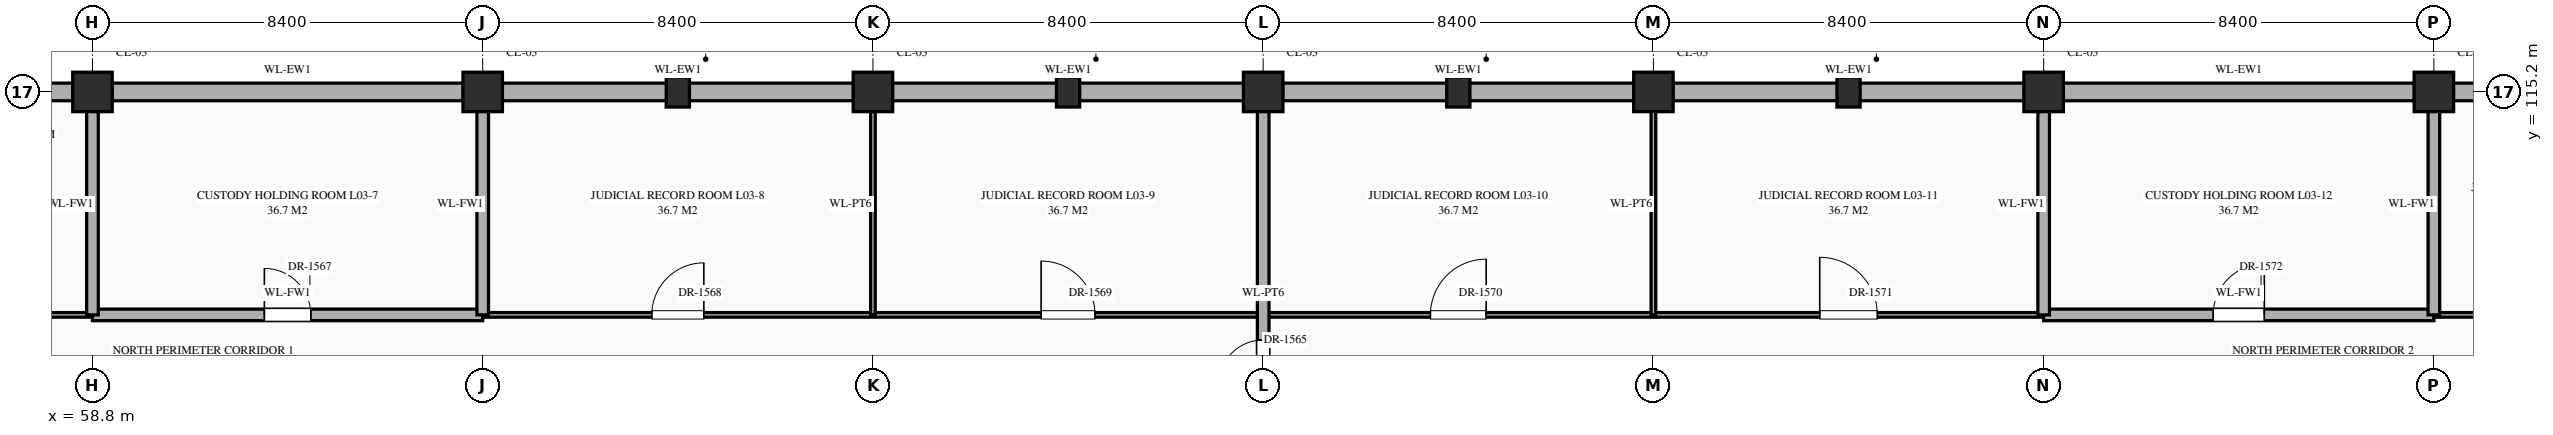
"""IFC4 building model, lengths in metres.
Left out: names, types, materials, properties, quantities, classifications, styles, units other than length and angle.
Written with IfcOpenShell. Run it as: python <this file> out.ifc"""

import sys

from ifc_helpers import new_model, si_unit, direction, frame, frame_2d, origin, origin_2d, place, context, subcontext, project, spatial, rectangle, extrude, element, fill, save


model = new_model("IFC4")
c1 = context("Model", 3, precision=1e-05, world=origin(), true_north=direction((0.0, 1.0)))
c2 = subcontext(c1, "Body", "Model", "MODEL_VIEW")
j1 = project(units=[si_unit("LENGTHUNIT", "METRE"), si_unit("PLANEANGLEUNIT", "RADIAN")], contexts=[c1])
p1 = place(None, origin())
s1 = spatial("IfcSite", under=j1, at=p1, CompositionType="ELEMENT")
p2 = place(p1, origin())
s2 = spatial("IfcBuilding", under=s1, at=p2, CompositionType="ELEMENT")
p3 = place(p2, frame((0.0, 0.0, 10.8)))
s3 = spatial("IfcBuildingStorey", under=s2, at=p3, CompositionType="ELEMENT", Elevation=10.8)
for number, where, z_axis, x_axis in (
    (1, (58.8, 115.2, 0.0), (0.0, 0.0, 1.0), (1.0, 0.0, 0.0)),
    (2, (67.2, 115.2, 0.0), (0.0, 0.0, 1.0), (1.0, 0.0, 0.0)),
    (3, (75.6, 115.2, 0.0), (0.0, 0.0, 1.0), (1.0, 0.0, 0.0)),
    (4, (84.0, 115.2, 0.0), (0.0, 0.0, 1.0), (1.0, 0.0, 0.0)),
    (5, (92.4, 115.2, 0.0), (0.0, 0.0, 1.0), (1.0, 0.0, 0.0)),
    (6, (100.8, 115.2, 0.0), (0.0, 0.0, 1.0), (1.0, 0.0, 0.0)),
    (7, (109.2, 115.2, 0.0), (0.0, 0.0, 1.0), (1.0, 0.0, 0.0)),
):
    element("IfcColumn", number, at=place(p3, frame(where, z_axis=z_axis, x_axis=x_axis)), inside=s3, PredefinedType="COLUMN", context=c2, shape_type="SweptSolid", body=[
        extrude(rectangle(XDim=0.85, YDim=0.85, at=origin_2d()), origin(), (0.0, 0.0, 1.0), 5.4),
    ])
for number, where, z_axis, x_axis in (
    (8, (71.4, 115.2, 0.0), (0.0, 0.0, 1.0), (1.0, 0.0, 0.0)),
    (9, (79.8, 115.2, 0.0), (0.0, 0.0, 1.0), (1.0, 0.0, 0.0)),
    (10, (88.2, 115.2, 0.0), (0.0, 0.0, 1.0), (1.0, 0.0, 0.0)),
    (11, (96.6, 115.2, 0.0), (0.0, 0.0, 1.0), (1.0, 0.0, 0.0)),
):
    element("IfcColumn", number, at=place(p3, frame(where, z_axis=z_axis, x_axis=x_axis)), inside=s3, PredefinedType="PILASTER", context=c2, shape_type="SweptSolid", body=[
        extrude(rectangle(XDim=0.5, YDim=0.65, at=origin_2d()), origin(), (0.0, 0.0, 1.0), 5.4),
    ])
p4 = place(p3, frame((50.82, 115.2, 0.0), z_axis=(0.0, 0.0, 1.0), x_axis=(1.0, 0.0, 0.0)))
e12 = element("IfcWall", 12, at=p4, inside=s3, PredefinedType="STANDARD", context=c2, shape_type="SweptSolid", body=[
    extrude(rectangle(XDim=7.56, YDim=0.38, at=frame_2d((3.78, 0.0))), origin(), (0.0, 0.0, 1.0), 4.47),
])
p5 = place(p3, frame((59.22, 115.2, 0.0), z_axis=(0.0, 0.0, 1.0), x_axis=(1.0, 0.0, 0.0)))
e13 = element("IfcWall", 13, at=p5, inside=s3, PredefinedType="STANDARD", context=c2, shape_type="SweptSolid", body=[
    extrude(rectangle(XDim=7.56, YDim=0.38, at=frame_2d((3.78, 0.0))), origin(), (0.0, 0.0, 1.0), 4.47),
])
p6 = place(p3, frame((67.62, 115.2, 0.0), z_axis=(0.0, 0.0, 1.0), x_axis=(1.0, 0.0, 0.0)))
e14 = element("IfcWall", 14, at=p6, inside=s3, PredefinedType="STANDARD", context=c2, shape_type="SweptSolid", body=[
    extrude(rectangle(XDim=7.56, YDim=0.38, at=frame_2d((3.78, 0.0))), origin(), (0.0, 0.0, 1.0), 4.47),
])
for number, where, z_axis, x_axis in (
    (15, (76.02, 115.2, 0.0), (0.0, 0.0, 1.0), (1.0, 0.0, 0.0)),
    (16, (84.42, 115.2, 0.0), (0.0, 0.0, 1.0), (1.0, 0.0, 0.0)),
):
    element("IfcWall", number, at=place(p3, frame(where, z_axis=z_axis, x_axis=x_axis)), inside=s3, PredefinedType="STANDARD", context=c2, shape_type="SweptSolid", body=[
        extrude(rectangle(XDim=7.56, YDim=0.38, at=frame_2d((3.78, 0.0))), origin(), (0.0, 0.0, 1.0), 4.47),
    ])
p7 = place(p3, frame((92.82, 115.2, 0.0), z_axis=(0.0, 0.0, 1.0), x_axis=(1.0, 0.0, 0.0)))
e17 = element("IfcWall", 17, at=p7, inside=s3, PredefinedType="STANDARD", context=c2, shape_type="SweptSolid", body=[
    extrude(rectangle(XDim=7.56, YDim=0.38, at=frame_2d((3.78, 0.0))), origin(), (0.0, 0.0, 1.0), 4.47),
])
p8 = place(p3, frame((101.22, 115.2, 0.0), z_axis=(0.0, 0.0, 1.0), x_axis=(1.0, 0.0, 0.0)))
e18 = element("IfcWall", 18, at=p8, inside=s3, PredefinedType="STANDARD", context=c2, shape_type="SweptSolid", body=[
    extrude(rectangle(XDim=7.56, YDim=0.38, at=frame_2d((3.78, 0.0))), origin(), (0.0, 0.0, 1.0), 4.47),
])
p9 = place(p3, frame((109.62, 115.2, 0.0), z_axis=(0.0, 0.0, 1.0), x_axis=(1.0, 0.0, 0.0)))
e19 = element("IfcWall", 19, at=p9, inside=s3, PredefinedType="STANDARD", context=c2, shape_type="SweptSolid", body=[
    extrude(rectangle(XDim=7.56, YDim=0.38, at=frame_2d((3.78, 0.0))), origin(), (0.0, 0.0, 1.0), 4.47),
])
p10 = place(p3, frame((50.44, 110.4, 0.0), z_axis=(0.0, 0.0, 1.0), x_axis=(1.0, 0.0, 0.0)))
e20 = element("IfcWall", 20, at=p10, inside=s3, PredefinedType="STANDARD", context=c2, shape_type="SweptSolid", body=[
    extrude(rectangle(XDim=8.36, YDim=0.1, at=frame_2d((4.18, 0.0))), origin(), (0.0, 0.0, 1.0), 5.12),
])
p11 = place(p10, frame((3.66, 0.0, 0.0)))
e21 = element("IfcOpeningElement", 21, at=p11, cuts=e20, PredefinedType="OPENING", context=c2, shape_type="SweptSolid", body=[
    extrude(rectangle(XDim=1.04, YDim=2.2, at=frame_2d((0.52, 1.1))), frame((0.0, 0.062, 0.0), z_axis=(0.0, -1.0, 0.0), x_axis=(1.0, 0.0, 0.0)), (0.0, 0.0, 1.0), 0.124),
])
p12 = place(p3, frame((58.8, 110.4, 0.0), z_axis=(0.0, 0.0, 1.0), x_axis=(1.0, 0.0, 0.0)))
e22 = element("IfcWall", 22, at=p12, inside=s3, PredefinedType="STANDARD", context=c2, shape_type="SweptSolid", body=[
    extrude(rectangle(XDim=8.4, YDim=0.25, at=frame_2d((4.2, 0.0))), origin(), (0.0, 0.0, 1.0), 5.12),
])
p13 = place(p12, frame((3.7, 0.0, 0.0)))
e23 = element("IfcOpeningElement", 23, at=p13, cuts=e22, PredefinedType="OPENING", context=c2, shape_type="SweptSolid", body=[
    extrude(rectangle(XDim=1.0, YDim=2.2, at=frame_2d((0.5, 1.1))), frame((0.0, 0.137, 0.0), z_axis=(0.0, -1.0, 0.0), x_axis=(1.0, 0.0, 0.0)), (0.0, 0.0, 1.0), 0.274),
])
p14 = place(p3, frame((67.2, 110.4, 0.0), z_axis=(0.0, 0.0, 1.0), x_axis=(1.0, 0.0, 0.0)))
e24 = element("IfcWall", 24, at=p14, inside=s3, PredefinedType="STANDARD", context=c2, shape_type="SweptSolid", body=[
    extrude(rectangle(XDim=33.6, YDim=0.1, at=frame_2d((16.8, 0.0))), origin(), (0.0, 0.0, 1.0), 5.12),
])
p15 = place(p14, frame((3.64, 0.0, 0.0)))
e25 = element("IfcOpeningElement", 25, at=p15, cuts=e24, PredefinedType="OPENING", context=c2, shape_type="SweptSolid", body=[
    extrude(rectangle(XDim=1.12, YDim=2.25, at=frame_2d((0.56, 1.125))), frame((0.0, 0.062, 0.0), z_axis=(0.0, -1.0, 0.0), x_axis=(1.0, 0.0, 0.0)), (0.0, 0.0, 1.0), 0.124),
])
p16 = place(p14, frame((12.02, 0.0, 0.0)))
e26 = element("IfcOpeningElement", 26, at=p16, cuts=e24, PredefinedType="OPENING", context=c2, shape_type="SweptSolid", body=[
    extrude(rectangle(XDim=1.16, YDim=2.3, at=frame_2d((0.58, 1.15))), frame((0.0, 0.062, 0.0), z_axis=(0.0, -1.0, 0.0), x_axis=(1.0, 0.0, 0.0)), (0.0, 0.0, 1.0), 0.124),
])
p17 = place(p14, frame((20.4, 0.0, 0.0)))
e27 = element("IfcOpeningElement", 27, at=p17, cuts=e24, PredefinedType="OPENING", context=c2, shape_type="SweptSolid", body=[
    extrude(rectangle(XDim=1.2, YDim=2.35, at=frame_2d((0.6, 1.175))), frame((0.0, 0.062, 0.0), z_axis=(0.0, -1.0, 0.0), x_axis=(1.0, 0.0, 0.0)), (0.0, 0.0, 1.0), 0.124),
])
p18 = place(p14, frame((28.78, 0.0, 0.0)))
e28 = element("IfcOpeningElement", 28, at=p18, cuts=e24, PredefinedType="OPENING", context=c2, shape_type="SweptSolid", body=[
    extrude(rectangle(XDim=1.24, YDim=2.3, at=frame_2d((0.62, 1.15))), frame((0.0, 0.062, 0.0), z_axis=(0.0, -1.0, 0.0), x_axis=(1.0, 0.0, 0.0)), (0.0, 0.0, 1.0), 0.124),
])
p19 = place(p3, frame((100.8, 110.4, 0.0), z_axis=(0.0, 0.0, 1.0), x_axis=(1.0, 0.0, 0.0)))
e29 = element("IfcWall", 29, at=p19, inside=s3, PredefinedType="STANDARD", context=c2, shape_type="SweptSolid", body=[
    extrude(rectangle(XDim=8.4, YDim=0.25, at=frame_2d((4.2, 0.0))), origin(), (0.0, 0.0, 1.0), 5.12),
])
p20 = place(p19, frame((3.65, 0.0, 0.0)))
e30 = element("IfcOpeningElement", 30, at=p20, cuts=e29, PredefinedType="OPENING", context=c2, shape_type="SweptSolid", body=[
    extrude(rectangle(XDim=1.1, YDim=2.2, at=frame_2d((0.55, 1.1))), frame((0.0, 0.137, 0.0), z_axis=(0.0, -1.0, 0.0), x_axis=(1.0, 0.0, 0.0)), (0.0, 0.0, 1.0), 0.274),
])
p21 = place(p3, frame((109.2, 110.4, 0.0), z_axis=(0.0, 0.0, 1.0), x_axis=(1.0, 0.0, 0.0)))
e31 = element("IfcWall", 31, at=p21, inside=s3, PredefinedType="STANDARD", context=c2, shape_type="SweptSolid", body=[
    extrude(rectangle(XDim=8.36, YDim=0.1, at=frame_2d((4.18, 0.0))), origin(), (0.0, 0.0, 1.0), 5.12),
])
p22 = place(p21, frame((3.71, 0.0, 0.0)))
e32 = element("IfcOpeningElement", 32, at=p22, cuts=e31, PredefinedType="OPENING", context=c2, shape_type="SweptSolid", body=[
    extrude(rectangle(XDim=0.94, YDim=2.3, at=frame_2d((0.47, 1.15))), frame((0.0, 0.062, 0.0), z_axis=(0.0, -1.0, 0.0), x_axis=(1.0, 0.0, 0.0)), (0.0, 0.0, 1.0), 0.124),
])
for number, where, z_axis, x_axis in (
    (33, (58.8, 110.4, 0.0), (0.0, 0.0, 1.0), (0.0, 1.0, 0.0)),
    (34, (67.2, 110.4, 0.0), (0.0, 0.0, 1.0), (0.0, 1.0, 0.0)),
):
    element("IfcWall", number, at=place(p3, frame(where, z_axis=z_axis, x_axis=x_axis)), inside=s3, PredefinedType="STANDARD", context=c2, shape_type="SweptSolid", body=[
        extrude(rectangle(XDim=4.76, YDim=0.25, at=frame_2d((2.38, 0.0))), origin(), (0.0, 0.0, 1.0), 4.37),
    ])
p23 = place(p3, frame((75.6, 110.4, 0.0), z_axis=(0.0, 0.0, 1.0), x_axis=(0.0, 1.0, 0.0)))
e35 = element("IfcWall", 35, at=p23, inside=s3, PredefinedType="STANDARD", context=c2, shape_type="SweptSolid", body=[
    extrude(rectangle(XDim=4.76, YDim=0.1, at=frame_2d((2.38, 0.0))), origin(), (0.0, 0.0, 1.0), 4.37),
])
p24 = place(p3, frame((84.0, 79.2, 0.0), z_axis=(0.0, 0.0, 1.0), x_axis=(0.0, 1.0, 0.0)))
e36 = element("IfcWall", 36, at=p24, inside=s3, PredefinedType="STANDARD", context=c2, shape_type="SweptSolid", body=[
    extrude(rectangle(XDim=35.96, YDim=0.25, at=frame_2d((17.98, 0.0))), origin(), (0.0, 0.0, 1.0), 4.37),
])
p25 = place(p24, frame((22.835, 0.0, 0.0)))
e37 = element("IfcOpeningElement", 37, at=p25, cuts=e36, PredefinedType="OPENING", context=c2, shape_type="SweptSolid", body=[
    extrude(rectangle(XDim=1.5, YDim=2.25, at=frame_2d((0.75, 1.125))), frame((0.0, 0.137, 0.0), z_axis=(0.0, -1.0, 0.0), x_axis=(1.0, 0.0, 0.0)), (0.0, 0.0, 1.0), 0.274),
])
p26 = place(p24, frame((12.465, 0.0, 0.0)))
e38 = element("IfcOpeningElement", 38, at=p26, cuts=e36, PredefinedType="OPENING", context=c2, shape_type="SweptSolid", body=[
    extrude(rectangle(XDim=1.1, YDim=2.2, at=frame_2d((0.55, 1.1))), frame((0.0, 0.137, 0.0), z_axis=(0.0, -1.0, 0.0), x_axis=(1.0, 0.0, 0.0)), (0.0, 0.0, 1.0), 0.274),
])
p27 = place(p24, frame((15.31, 0.0, 0.0)))
e39 = element("IfcOpeningElement", 39, at=p27, cuts=e36, PredefinedType="OPENING", context=c2, shape_type="SweptSolid", body=[
    extrude(rectangle(XDim=0.95, YDim=2.15, at=frame_2d((0.475, 1.075))), frame((0.0, 0.137, 0.0), z_axis=(0.0, -1.0, 0.0), x_axis=(1.0, 0.0, 0.0)), (0.0, 0.0, 1.0), 0.274),
])
p28 = place(p24, frame((25.915, 0.0, 0.0)))
e40 = element("IfcOpeningElement", 40, at=p28, cuts=e36, PredefinedType="OPENING", context=c2, shape_type="SweptSolid", body=[
    extrude(rectangle(XDim=1.8, YDim=2.35, at=frame_2d((0.9, 1.175))), frame((0.0, 0.137, 0.0), z_axis=(0.0, -1.0, 0.0), x_axis=(1.0, 0.0, 0.0)), (0.0, 0.0, 1.0), 0.274),
])
p29 = place(p24, frame((29.71, 0.0, 0.0)))
e41 = element("IfcOpeningElement", 41, at=p29, cuts=e36, PredefinedType="OPENING", context=c2, shape_type="SweptSolid", body=[
    extrude(rectangle(XDim=0.95, YDim=2.15, at=frame_2d((0.475, 1.075))), frame((0.0, 0.137, 0.0), z_axis=(0.0, -1.0, 0.0), x_axis=(1.0, 0.0, 0.0)), (0.0, 0.0, 1.0), 0.274),
])
p30 = place(p24, frame((5.265, 0.0, 0.0)))
e42 = element("IfcOpeningElement", 42, at=p30, cuts=e36, PredefinedType="OPENING", context=c2, shape_type="SweptSolid", body=[
    extrude(rectangle(XDim=1.1, YDim=2.2, at=frame_2d((0.55, 1.1))), frame((0.0, 0.137, 0.0), z_axis=(0.0, -1.0, 0.0), x_axis=(1.0, 0.0, 0.0)), (0.0, 0.0, 1.0), 0.274),
])
p31 = place(p3, frame((92.4, 110.4, 0.0), z_axis=(0.0, 0.0, 1.0), x_axis=(0.0, 1.0, 0.0)))
e43 = element("IfcWall", 43, at=p31, inside=s3, PredefinedType="STANDARD", context=c2, shape_type="SweptSolid", body=[
    extrude(rectangle(XDim=4.76, YDim=0.1, at=frame_2d((2.38, 0.0))), origin(), (0.0, 0.0, 1.0), 4.37),
])
for number, where, z_axis, x_axis in (
    (44, (100.8, 110.4, 0.0), (0.0, 0.0, 1.0), (0.0, 1.0, 0.0)),
    (45, (109.2, 110.4, 0.0), (0.0, 0.0, 1.0), (0.0, 1.0, 0.0)),
):
    element("IfcWall", number, at=place(p3, frame(where, z_axis=z_axis, x_axis=x_axis)), inside=s3, PredefinedType="STANDARD", context=c2, shape_type="SweptSolid", body=[
        extrude(rectangle(XDim=4.76, YDim=0.25, at=frame_2d((2.38, 0.0))), origin(), (0.0, 0.0, 1.0), 4.37),
    ])
p32 = place(p29, origin())
e46 = element("IfcDoor", 46, at=p32, inside=s3, OperationType="SINGLE_SWING_LEFT", PredefinedType="DOOR", context=c2, shape_type="SweptSolid", body=[
    extrude(rectangle(XDim=0.95, YDim=2.15, at=frame_2d((0.475, 1.075))), frame((0.0, 0.025, 0.0), z_axis=(0.0, -1.0, 0.0), x_axis=(1.0, 0.0, 0.0)), (0.0, 0.0, 1.0), 0.05),
])
fill(e41, e46)
p33 = place(p13, origin())
e47 = element("IfcDoor", 47, at=p33, inside=s3, OperationType="SINGLE_SWING_LEFT", PredefinedType="DOOR", context=c2, shape_type="SweptSolid", body=[
    extrude(rectangle(XDim=1.0, YDim=2.2, at=frame_2d((0.5, 1.1))), frame((0.0, 0.025, 0.0), z_axis=(0.0, -1.0, 0.0), x_axis=(1.0, 0.0, 0.0)), (0.0, 0.0, 1.0), 0.05),
])
fill(e23, e47)
p34 = place(p15, origin())
e48 = element("IfcDoor", 48, at=p34, inside=s3, OperationType="SINGLE_SWING_RIGHT", PredefinedType="DOOR", context=c2, shape_type="SweptSolid", body=[
    extrude(rectangle(XDim=1.12, YDim=2.25, at=frame_2d((0.56, 1.125))), frame((0.0, 0.025, 0.0), z_axis=(0.0, -1.0, 0.0), x_axis=(1.0, 0.0, 0.0)), (0.0, 0.0, 1.0), 0.05),
])
fill(e25, e48)
p35 = place(p16, origin())
e49 = element("IfcDoor", 49, at=p35, inside=s3, OperationType="SINGLE_SWING_LEFT", PredefinedType="DOOR", context=c2, shape_type="SweptSolid", body=[
    extrude(rectangle(XDim=1.16, YDim=2.3, at=frame_2d((0.58, 1.15))), frame((0.0, 0.025, 0.0), z_axis=(0.0, -1.0, 0.0), x_axis=(1.0, 0.0, 0.0)), (0.0, 0.0, 1.0), 0.05),
])
fill(e26, e49)
p36 = place(p17, origin())
e50 = element("IfcDoor", 50, at=p36, inside=s3, OperationType="SINGLE_SWING_RIGHT", PredefinedType="DOOR", context=c2, shape_type="SweptSolid", body=[
    extrude(rectangle(XDim=1.2, YDim=2.35, at=frame_2d((0.6, 1.175))), frame((0.0, 0.025, 0.0), z_axis=(0.0, -1.0, 0.0), x_axis=(1.0, 0.0, 0.0)), (0.0, 0.0, 1.0), 0.05),
])
fill(e27, e50)
p37 = place(p18, origin())
e51 = element("IfcDoor", 51, at=p37, inside=s3, OperationType="SINGLE_SWING_LEFT", PredefinedType="DOOR", context=c2, shape_type="SweptSolid", body=[
    extrude(rectangle(XDim=1.24, YDim=2.3, at=frame_2d((0.62, 1.15))), frame((0.0, 0.025, 0.0), z_axis=(0.0, -1.0, 0.0), x_axis=(1.0, 0.0, 0.0)), (0.0, 0.0, 1.0), 0.05),
])
fill(e28, e51)
p38 = place(p20, origin())
e52 = element("IfcDoor", 52, at=p38, inside=s3, OperationType="SINGLE_SWING_RIGHT", PredefinedType="DOOR", context=c2, shape_type="SweptSolid", body=[
    extrude(rectangle(XDim=1.1, YDim=2.2, at=frame_2d((0.55, 1.1))), frame((0.0, 0.025, 0.0), z_axis=(0.0, -1.0, 0.0), x_axis=(1.0, 0.0, 0.0)), (0.0, 0.0, 1.0), 0.05),
])
fill(e30, e52)
save(model, sys.argv[1])
